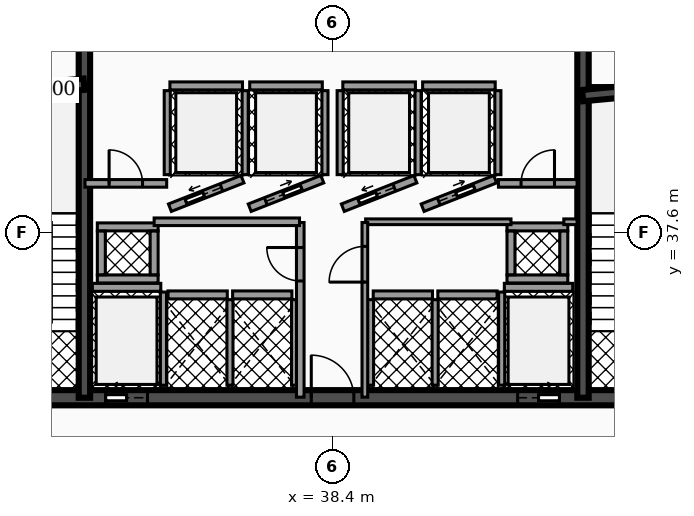
"""IFC4 building model, lengths in metres.
Left out: names, types, materials, properties, quantities, classifications, styles, units other than length and angle.
Written with IfcOpenShell. Run it as: python <this file> out.ifc"""

import sys

from ifc_helpers import new_model, si_unit, direction, frame, frame_2d, origin, place, context, subcontext, project, spatial, rectangle, extrude, element, fill, save


model = new_model("IFC4")
c1 = context("Model", 3, precision=1e-05, world=origin(), true_north=direction((0.0, 1.0)))
c2 = subcontext(c1, "Body", "Model", "MODEL_VIEW")
j1 = project(units=[si_unit("LENGTHUNIT", "METRE"), si_unit("PLANEANGLEUNIT", "RADIAN")], contexts=[c1])
p1 = place(None, origin())
s1 = spatial("IfcSite", under=j1, at=p1, CompositionType="ELEMENT")
p2 = place(p1, origin())
s2 = spatial("IfcBuilding", under=s1, at=p2, CompositionType="ELEMENT")
p3 = place(p2, frame((0.0, 0.0, 64.26)))
s3 = spatial("IfcBuildingStorey", under=s2, at=p3, CompositionType="ELEMENT", Elevation=64.26)
p4 = place(p3, frame((28.4, 33.25, 0.0), z_axis=(0.0, 0.0, 1.0), x_axis=(1.0, 0.0, 0.0)))
e1 = element("IfcWall", 1, at=p4, inside=s3, PredefinedType="SHEAR", context=c2, shape_type="SweptSolid", body=[
    extrude(rectangle(XDim=20.06, YDim=0.4, at=frame_2d((10.03, 0.0))), origin(), (0.0, 0.0, 1.0), 3.82),
])
p5 = place(p4, frame((4.03, 0.0, 0.0)))
e2 = element("IfcOpeningElement", 2, at=p5, cuts=e1, PredefinedType="OPENING", context=c2, shape_type="SweptSolid", body=[
    extrude(rectangle(XDim=1.1, YDim=2.15, at=frame_2d((0.55, 1.075))), frame((0.0, 0.21, 0.0), z_axis=(0.0, -1.0, 0.0), x_axis=(1.0, 0.0, 0.0)), (0.0, 0.0, 1.0), 0.42),
])
p6 = place(p4, frame((14.87, 0.0, 0.0)))
e3 = element("IfcOpeningElement", 3, at=p6, cuts=e1, PredefinedType="OPENING", context=c2, shape_type="SweptSolid", body=[
    extrude(rectangle(XDim=1.1, YDim=2.15, at=frame_2d((0.55, 1.075))), frame((0.0, 0.21, 0.0), z_axis=(0.0, -1.0, 0.0), x_axis=(1.0, 0.0, 0.0)), (0.0, 0.0, 1.0), 0.42),
])
p7 = place(p4, frame((1.31, 0.0, 0.0)))
e4 = element("IfcOpeningElement", 4, at=p7, cuts=e1, PredefinedType="OPENING", context=c2, shape_type="SweptSolid", body=[
    extrude(rectangle(XDim=1.1, YDim=2.2, at=frame_2d((0.55, 1.1))), frame((0.0, 0.21, 0.0), z_axis=(0.0, -1.0, 0.0), x_axis=(1.0, 0.0, 0.0)), (0.0, 0.0, 1.0), 0.42),
])
p8 = place(p4, frame((9.44, 0.0, 0.0)))
e5 = element("IfcOpeningElement", 5, at=p8, cuts=e1, PredefinedType="OPENING", context=c2, shape_type="SweptSolid", body=[
    extrude(rectangle(XDim=1.12, YDim=2.05, at=frame_2d((0.56, 1.025))), frame((0.0, 0.21, 0.0), z_axis=(0.0, -1.0, 0.0), x_axis=(1.0, 0.0, 0.0)), (0.0, 0.0, 1.0), 0.42),
])
p9 = place(p4, frame((17.65, 0.0, 0.0)))
e6 = element("IfcOpeningElement", 6, at=p9, cuts=e1, PredefinedType="OPENING", context=c2, shape_type="SweptSolid", body=[
    extrude(rectangle(XDim=1.1, YDim=2.2, at=frame_2d((0.55, 1.1))), frame((0.0, 0.21, 0.0), z_axis=(0.0, -1.0, 0.0), x_axis=(1.0, 0.0, 0.0)), (0.0, 0.0, 1.0), 0.42),
])
for number, where, z_axis, x_axis in (
    (7, (31.87, 33.25, 0.0), (0.0, 0.0, 1.0), (0.0, 1.0, 0.0)),
    (8, (44.99, 33.25, 0.0), (0.0, 0.0, 1.0), (0.0, 1.0, 0.0)),
):
    element("IfcWall", number, at=place(p3, frame(where, z_axis=z_axis, x_axis=x_axis)), inside=s3, PredefinedType="SHEAR", context=c2, shape_type="SweptSolid", body=[
        extrude(rectangle(XDim=10.2, YDim=0.3, at=frame_2d((5.1, 0.0))), origin(), (0.0, 0.0, 1.0), 3.82),
    ])
p10 = place(p3, frame((28.64, 41.2, 0.0), z_axis=(0.0, 0.0, 1.0), x_axis=(0.995687118776, 0.092774789157, 0.0)))
e9 = element("IfcWall", 9, at=p10, inside=s3, PredefinedType="SHEAR", context=c2, shape_type="SweptSolid", body=[
    extrude(rectangle(XDim=3.234, YDim=0.3, at=frame_2d((1.617, 0.0))), origin(), (0.0, 0.0, 1.0), 3.82),
])
p11 = place(p3, frame((44.98, 41.2, 0.0), z_axis=(0.0, 0.0, 1.0), x_axis=(0.995686468965, 0.09278176286, 0.0)))
e10 = element("IfcWall", 10, at=p11, inside=s3, PredefinedType="SHEAR", context=c2, shape_type="SweptSolid", body=[
    extrude(rectangle(XDim=3.234, YDim=0.3, at=frame_2d((1.617, 0.0))), origin(), (0.0, 0.0, 1.0), 3.82),
])
p12 = place(p3, frame((32.08, 36.155, 0.0), z_axis=(0.0, 0.0, 1.0), x_axis=(1.0, 0.0, 0.0)))
e11 = element("IfcWall", 11, at=p12, inside=s3, PredefinedType="SOLIDWALL", context=c2, shape_type="SweptSolid", body=[
    extrude(rectangle(XDim=1.8, YDim=0.21, at=frame_2d((0.9, 0.0))), origin(), (0.0, 0.0, 1.0), 2.792),
])
p13 = place(p3, frame((33.95, 33.58, 0.0), z_axis=(0.0, 0.0, 1.0), x_axis=(0.0, 1.0, 0.0)))
e12 = element("IfcWall", 12, at=p13, inside=s3, PredefinedType="SOLIDWALL", context=c2, shape_type="SweptSolid", body=[
    extrude(rectangle(XDim=2.45, YDim=0.16, at=frame_2d((1.225, 0.0))), origin(), (0.0, 0.0, 1.0), 2.792),
])
p14 = place(p3, frame((42.92, 36.155, 0.0), z_axis=(0.0, 0.0, 1.0), x_axis=(1.0, 0.0, 0.0)))
e13 = element("IfcWall", 13, at=p14, inside=s3, PredefinedType="SOLIDWALL", context=c2, shape_type="SweptSolid", body=[
    extrude(rectangle(XDim=1.8, YDim=0.21, at=frame_2d((0.9, 0.0))), origin(), (0.0, 0.0, 1.0), 2.792),
])
p15 = place(p3, frame((42.85, 33.58, 0.0), z_axis=(0.0, 0.0, 1.0), x_axis=(0.0, 1.0, 0.0)))
e14 = element("IfcWall", 14, at=p15, inside=s3, PredefinedType="SOLIDWALL", context=c2, shape_type="SweptSolid", body=[
    extrude(rectangle(XDim=2.45, YDim=0.16, at=frame_2d((1.225, 0.0))), origin(), (0.0, 0.0, 1.0), 2.792),
])
p16 = place(p3, frame((34.12, 38.25, 0.0), z_axis=(0.0, 0.0, 1.0), x_axis=(0.930804993012, 0.36551616241, 0.0)))
e15 = element("IfcWall", 15, at=p16, inside=s3, PredefinedType="SOLIDWALL", context=c2, shape_type="SweptSolid", body=[
    extrude(rectangle(XDim=2.052, YDim=0.21, at=frame_2d((1.026, 0.0))), origin(), (0.0, 0.0, 1.0), 2.792),
])
p17 = place(p16, frame((0.455, 0.0, 0.0)))
e16 = element("IfcOpeningElement", 16, at=p17, cuts=e15, PredefinedType="OPENING", context=c2, shape_type="SweptSolid", body=[
    extrude(rectangle(XDim=1.0, YDim=2.1, at=frame_2d((0.5, 1.05))), frame((0.0, 0.115, 0.0), z_axis=(0.0, -1.0, 0.0), x_axis=(1.0, 0.0, 0.0)), (0.0, 0.0, 1.0), 0.23),
])
p18 = place(p3, frame((34.12, 41.455, 0.0), z_axis=(0.0, 0.0, 1.0), x_axis=(1.0, 0.0, 0.0)))
e17 = element("IfcWall", 17, at=p18, inside=s3, PredefinedType="SOLIDWALL", context=c2, shape_type="SweptSolid", body=[
    extrude(rectangle(XDim=1.91, YDim=0.21, at=frame_2d((0.955, 0.0))), origin(), (0.0, 0.0, 1.0), 2.792),
])
for number, where, z_axis, x_axis in (
    (18, (34.05, 39.12, 0.0), (0.0, 0.0, 1.0), (0.0, 1.0, 0.0)),
    (19, (36.1, 39.12, 0.0), (0.0, 0.0, 1.0), (0.0, 1.0, 0.0)),
):
    element("IfcWall", number, at=place(p3, frame(where, z_axis=z_axis, x_axis=x_axis)), inside=s3, PredefinedType="SOLIDWALL", context=c2, shape_type="SweptSolid", body=[
        extrude(rectangle(XDim=2.21, YDim=0.16, at=frame_2d((1.105, 0.0))), origin(), (0.0, 0.0, 1.0), 2.792),
    ])
p19 = place(p3, frame((36.22, 38.25, 0.0), z_axis=(0.0, 0.0, 1.0), x_axis=(0.930804993012, 0.36551616241, 0.0)))
e20 = element("IfcWall", 20, at=p19, inside=s3, PredefinedType="SOLIDWALL", context=c2, shape_type="SweptSolid", body=[
    extrude(rectangle(XDim=2.052, YDim=0.21, at=frame_2d((1.026, 0.0))), origin(), (0.0, 0.0, 1.0), 2.792),
])
p20 = place(p19, frame((0.455, 0.0, 0.0)))
e21 = element("IfcOpeningElement", 21, at=p20, cuts=e20, PredefinedType="OPENING", context=c2, shape_type="SweptSolid", body=[
    extrude(rectangle(XDim=1.0, YDim=2.1, at=frame_2d((0.5, 1.05))), frame((0.0, 0.115, 0.0), z_axis=(0.0, -1.0, 0.0), x_axis=(1.0, 0.0, 0.0)), (0.0, 0.0, 1.0), 0.23),
])
p21 = place(p3, frame((36.22, 41.455, 0.0), z_axis=(0.0, 0.0, 1.0), x_axis=(1.0, 0.0, 0.0)))
e22 = element("IfcWall", 22, at=p21, inside=s3, PredefinedType="SOLIDWALL", context=c2, shape_type="SweptSolid", body=[
    extrude(rectangle(XDim=1.91, YDim=0.21, at=frame_2d((0.955, 0.0))), origin(), (0.0, 0.0, 1.0), 2.792),
])
p22 = place(p3, frame((38.2, 39.12, 0.0), z_axis=(0.0, 0.0, 1.0), x_axis=(0.0, 1.0, 0.0)))
e23 = element("IfcWall", 23, at=p22, inside=s3, PredefinedType="SOLIDWALL", context=c2, shape_type="SweptSolid", body=[
    extrude(rectangle(XDim=2.21, YDim=0.16, at=frame_2d((1.105, 0.0))), origin(), (0.0, 0.0, 1.0), 2.792),
])
p23 = place(p3, frame((38.67, 38.25, 0.0), z_axis=(0.0, 0.0, 1.0), x_axis=(0.930820886763, 0.3654756856, 0.0)))
e24 = element("IfcWall", 24, at=p23, inside=s3, PredefinedType="SOLIDWALL", context=c2, shape_type="SweptSolid", body=[
    extrude(rectangle(XDim=2.052, YDim=0.21, at=frame_2d((1.026, 0.0))), origin(), (0.0, 0.0, 1.0), 2.792),
])
p24 = place(p23, frame((0.455, 0.0, 0.0)))
e25 = element("IfcOpeningElement", 25, at=p24, cuts=e24, PredefinedType="OPENING", context=c2, shape_type="SweptSolid", body=[
    extrude(rectangle(XDim=1.0, YDim=2.1, at=frame_2d((0.5, 1.05))), frame((0.0, 0.115, 0.0), z_axis=(0.0, -1.0, 0.0), x_axis=(1.0, 0.0, 0.0)), (0.0, 0.0, 1.0), 0.23),
])
p25 = place(p3, frame((38.67, 41.455, 0.0), z_axis=(0.0, 0.0, 1.0), x_axis=(1.0, 0.0, 0.0)))
e26 = element("IfcWall", 26, at=p25, inside=s3, PredefinedType="SOLIDWALL", context=c2, shape_type="SweptSolid", body=[
    extrude(rectangle(XDim=1.91, YDim=0.21, at=frame_2d((0.955, 0.0))), origin(), (0.0, 0.0, 1.0), 2.792),
])
for number, where, z_axis, x_axis in (
    (27, (38.6, 39.12, 0.0), (0.0, 0.0, 1.0), (0.0, 1.0, 0.0)),
    (28, (40.65, 39.12, 0.0), (0.0, 0.0, 1.0), (0.0, 1.0, 0.0)),
):
    element("IfcWall", number, at=place(p3, frame(where, z_axis=z_axis, x_axis=x_axis)), inside=s3, PredefinedType="SOLIDWALL", context=c2, shape_type="SweptSolid", body=[
        extrude(rectangle(XDim=2.21, YDim=0.16, at=frame_2d((1.105, 0.0))), origin(), (0.0, 0.0, 1.0), 2.792),
    ])
p26 = place(p3, frame((40.77, 38.25, 0.0), z_axis=(0.0, 0.0, 1.0), x_axis=(0.930804993012, 0.36551616241, 0.0)))
e29 = element("IfcWall", 29, at=p26, inside=s3, PredefinedType="SOLIDWALL", context=c2, shape_type="SweptSolid", body=[
    extrude(rectangle(XDim=2.052, YDim=0.21, at=frame_2d((1.026, 0.0))), origin(), (0.0, 0.0, 1.0), 2.792),
])
p27 = place(p26, frame((0.455, 0.0, 0.0)))
e30 = element("IfcOpeningElement", 30, at=p27, cuts=e29, PredefinedType="OPENING", context=c2, shape_type="SweptSolid", body=[
    extrude(rectangle(XDim=1.0, YDim=2.1, at=frame_2d((0.5, 1.05))), frame((0.0, 0.115, 0.0), z_axis=(0.0, -1.0, 0.0), x_axis=(1.0, 0.0, 0.0)), (0.0, 0.0, 1.0), 0.23),
])
p28 = place(p3, frame((40.77, 41.455, 0.0), z_axis=(0.0, 0.0, 1.0), x_axis=(1.0, 0.0, 0.0)))
e31 = element("IfcWall", 31, at=p28, inside=s3, PredefinedType="SOLIDWALL", context=c2, shape_type="SweptSolid", body=[
    extrude(rectangle(XDim=1.91, YDim=0.21, at=frame_2d((0.955, 0.0))), origin(), (0.0, 0.0, 1.0), 2.792),
])
p29 = place(p3, frame((42.75, 39.12, 0.0), z_axis=(0.0, 0.0, 1.0), x_axis=(0.0, 1.0, 0.0)))
e32 = element("IfcWall", 32, at=p29, inside=s3, PredefinedType="SOLIDWALL", context=c2, shape_type="SweptSolid", body=[
    extrude(rectangle(XDim=2.21, YDim=0.16, at=frame_2d((1.105, 0.0))), origin(), (0.0, 0.0, 1.0), 2.792),
])
p30 = place(p3, frame((34.07, 35.955, 0.0), z_axis=(0.0, 0.0, 1.0), x_axis=(1.0, 0.0, 0.0)))
e33 = element("IfcWall", 33, at=p30, inside=s3, PredefinedType="SOLIDWALL", context=c2, shape_type="SweptSolid", body=[
    extrude(rectangle(XDim=1.56, YDim=0.21, at=frame_2d((0.78, 0.0))), origin(), (0.0, 0.0, 1.0), 2.792),
])
p31 = place(p3, frame((35.7, 33.58, 0.0), z_axis=(0.0, 0.0, 1.0), x_axis=(0.0, 1.0, 0.0)))
e34 = element("IfcWall", 34, at=p31, inside=s3, PredefinedType="SOLIDWALL", context=c2, shape_type="SweptSolid", body=[
    extrude(rectangle(XDim=2.25, YDim=0.16, at=frame_2d((1.125, 0.0))), origin(), (0.0, 0.0, 1.0), 2.792),
])
p32 = place(p3, frame((35.77, 35.955, 0.0), z_axis=(0.0, 0.0, 1.0), x_axis=(1.0, 0.0, 0.0)))
e35 = element("IfcWall", 35, at=p32, inside=s3, PredefinedType="SOLIDWALL", context=c2, shape_type="SweptSolid", body=[
    extrude(rectangle(XDim=1.56, YDim=0.21, at=frame_2d((0.78, 0.0))), origin(), (0.0, 0.0, 1.0), 2.792),
])
p33 = place(p3, frame((37.4, 33.58, 0.0), z_axis=(0.0, 0.0, 1.0), x_axis=(0.0, 1.0, 0.0)))
e36 = element("IfcWall", 36, at=p33, inside=s3, PredefinedType="SOLIDWALL", context=c2, shape_type="SweptSolid", body=[
    extrude(rectangle(XDim=2.25, YDim=0.16, at=frame_2d((1.125, 0.0))), origin(), (0.0, 0.0, 1.0), 2.792),
])
p34 = place(p3, frame((39.47, 35.955, 0.0), z_axis=(0.0, 0.0, 1.0), x_axis=(1.0, 0.0, 0.0)))
e37 = element("IfcWall", 37, at=p34, inside=s3, PredefinedType="SOLIDWALL", context=c2, shape_type="SweptSolid", body=[
    extrude(rectangle(XDim=1.56, YDim=0.21, at=frame_2d((0.78, 0.0))), origin(), (0.0, 0.0, 1.0), 2.792),
])
for number, where, z_axis, x_axis in (
    (38, (39.4, 33.58, 0.0), (0.0, 0.0, 1.0), (0.0, 1.0, 0.0)),
    (39, (41.1, 33.58, 0.0), (0.0, 0.0, 1.0), (0.0, 1.0, 0.0)),
):
    element("IfcWall", number, at=place(p3, frame(where, z_axis=z_axis, x_axis=x_axis)), inside=s3, PredefinedType="SOLIDWALL", context=c2, shape_type="SweptSolid", body=[
        extrude(rectangle(XDim=2.25, YDim=0.16, at=frame_2d((1.125, 0.0))), origin(), (0.0, 0.0, 1.0), 2.792),
    ])
p35 = place(p3, frame((41.17, 35.955, 0.0), z_axis=(0.0, 0.0, 1.0), x_axis=(1.0, 0.0, 0.0)))
e40 = element("IfcWall", 40, at=p35, inside=s3, PredefinedType="SOLIDWALL", context=c2, shape_type="SweptSolid", body=[
    extrude(rectangle(XDim=1.56, YDim=0.21, at=frame_2d((0.78, 0.0))), origin(), (0.0, 0.0, 1.0), 2.792),
])
for number, where, z_axis, x_axis in (
    (41, (32.21, 36.375, 0.0), (0.0, 0.0, 1.0), (1.0, 0.0, 0.0)),
    (42, (32.21, 37.745, 0.0), (0.0, 0.0, 1.0), (1.0, 0.0, 0.0)),
):
    element("IfcWall", number, at=place(p3, frame(where, z_axis=z_axis, x_axis=x_axis)), inside=s3, PredefinedType="SOLIDWALL", context=c2, shape_type="SweptSolid", body=[
        extrude(rectangle(XDim=1.6, YDim=0.21, at=frame_2d((0.8, 0.0))), origin(), (0.0, 0.0, 1.0), 3.82),
    ])
for number, where, z_axis, x_axis in (
    (43, (32.315, 36.485, 0.0), (0.0, 0.0, 1.0), (0.0, 1.0, 0.0)),
    (44, (33.705, 36.485, 0.0), (0.0, 0.0, 1.0), (0.0, 1.0, 0.0)),
):
    element("IfcWall", number, at=place(p3, frame(where, z_axis=z_axis, x_axis=x_axis)), inside=s3, PredefinedType="SOLIDWALL", context=c2, shape_type="SweptSolid", body=[
        extrude(rectangle(XDim=1.15, YDim=0.21, at=frame_2d((0.575, 0.0))), origin(), (0.0, 0.0, 1.0), 3.82),
    ])
for number, where, z_axis, x_axis in (
    (45, (42.99, 36.375, 0.0), (0.0, 0.0, 1.0), (1.0, 0.0, 0.0)),
    (46, (42.99, 37.745, 0.0), (0.0, 0.0, 1.0), (1.0, 0.0, 0.0)),
):
    element("IfcWall", number, at=place(p3, frame(where, z_axis=z_axis, x_axis=x_axis)), inside=s3, PredefinedType="SOLIDWALL", context=c2, shape_type="SweptSolid", body=[
        extrude(rectangle(XDim=1.6, YDim=0.21, at=frame_2d((0.8, 0.0))), origin(), (0.0, 0.0, 1.0), 3.82),
    ])
for number, where, z_axis, x_axis in (
    (47, (43.095, 36.485, 0.0), (0.0, 0.0, 1.0), (0.0, 1.0, 0.0)),
    (48, (44.485, 36.485, 0.0), (0.0, 0.0, 1.0), (0.0, 1.0, 0.0)),
):
    element("IfcWall", number, at=place(p3, frame(where, z_axis=z_axis, x_axis=x_axis)), inside=s3, PredefinedType="SOLIDWALL", context=c2, shape_type="SweptSolid", body=[
        extrude(rectangle(XDim=1.15, YDim=0.21, at=frame_2d((0.575, 0.0))), origin(), (0.0, 0.0, 1.0), 3.82),
    ])
p36 = place(p3, frame((37.55, 33.265, 0.0), z_axis=(0.0, 0.0, 1.0), x_axis=(0.0, 1.0, 0.0)))
e49 = element("IfcWall", 49, at=p36, inside=s3, PredefinedType="PARTITIONING", context=c2, shape_type="SweptSolid", body=[
    extrude(rectangle(XDim=4.595, YDim=0.2, at=frame_2d((2.298, 0.0))), origin(), (0.0, 0.0, 1.0), 2.777),
])
p37 = place(p36, frame((3.058, 0.0, 0.0)))
e50 = element("IfcOpeningElement", 50, at=p37, cuts=e49, PredefinedType="OPENING", context=c2, shape_type="SweptSolid", body=[
    extrude(rectangle(XDim=0.88, YDim=2.05, at=frame_2d((0.44, 1.025))), frame((0.0, 0.11, 0.0), z_axis=(0.0, -1.0, 0.0), x_axis=(1.0, 0.0, 0.0)), (0.0, 0.0, 1.0), 0.22),
])
p38 = place(p3, frame((33.705, 37.88, 0.0), z_axis=(0.0, 0.0, 1.0), x_axis=(1.0, 0.0, 0.0)))
e51 = element("IfcWall", 51, at=p38, inside=s3, PredefinedType="PARTITIONING", context=c2, shape_type="SweptSolid", body=[
    extrude(rectangle(XDim=3.825, YDim=0.2, at=frame_2d((1.913, 0.0))), origin(), (0.0, 0.0, 1.0), 2.777),
])
p39 = place(p3, frame((31.885, 38.89, 0.0), z_axis=(0.0, 0.0, 1.0), x_axis=(1.0, 0.0, 0.0)))
e52 = element("IfcWall", 52, at=p39, inside=s3, PredefinedType="PARTITIONING", context=c2, shape_type="SweptSolid", body=[
    extrude(rectangle(XDim=2.15, YDim=0.2, at=frame_2d((1.075, 0.0))), origin(), (0.0, 0.0, 1.0), 2.777),
])
p40 = place(p39, frame((0.635, 0.0, 0.0)))
e53 = element("IfcOpeningElement", 53, at=p40, cuts=e52, PredefinedType="OPENING", context=c2, shape_type="SweptSolid", body=[
    extrude(rectangle(XDim=0.88, YDim=2.05, at=frame_2d((0.44, 1.025))), frame((0.0, 0.11, 0.0), z_axis=(0.0, -1.0, 0.0), x_axis=(1.0, 0.0, 0.0)), (0.0, 0.0, 1.0), 0.22),
])
p41 = place(p3, frame((42.765, 38.89, 0.0), z_axis=(0.0, 0.0, 1.0), x_axis=(1.0, 0.0, 0.0)))
e54 = element("IfcWall", 54, at=p41, inside=s3, PredefinedType="PARTITIONING", context=c2, shape_type="SweptSolid", body=[
    extrude(rectangle(XDim=2.07, YDim=0.2, at=frame_2d((1.035, 0.0))), origin(), (0.0, 0.0, 1.0), 2.777),
])
p42 = place(p41, frame((0.595, 0.0, 0.0)))
e55 = element("IfcOpeningElement", 55, at=p42, cuts=e54, PredefinedType="OPENING", context=c2, shape_type="SweptSolid", body=[
    extrude(rectangle(XDim=0.88, YDim=2.05, at=frame_2d((0.44, 1.025))), frame((0.0, 0.11, 0.0), z_axis=(0.0, -1.0, 0.0), x_axis=(1.0, 0.0, 0.0)), (0.0, 0.0, 1.0), 0.22),
])
p43 = place(p3, frame((39.27, 37.88, 0.0), z_axis=(0.0, 0.0, 1.0), x_axis=(1.0, 0.0, 0.0)))
e56 = element("IfcWall", 56, at=p43, inside=s3, PredefinedType="PARTITIONING", context=c2, shape_type="SweptSolid", body=[
    extrude(rectangle(XDim=3.825, YDim=0.15, at=frame_2d((1.913, 0.0))), origin(), (0.0, 0.0, 1.0), 2.777),
])
p44 = place(p3, frame((44.485, 37.88, 0.0), z_axis=(0.0, 0.0, 1.0), x_axis=(1.0, 0.0, 0.0)))
e57 = element("IfcWall", 57, at=p44, inside=s3, PredefinedType="PARTITIONING", context=c2, shape_type="SweptSolid", body=[
    extrude(rectangle(XDim=0.35, YDim=0.15, at=frame_2d((0.175, 0.0))), origin(), (0.0, 0.0, 1.0), 2.777),
])
p45 = place(p3, frame((39.25, 33.265, 0.0), z_axis=(0.0, 0.0, 1.0), x_axis=(0.0, 1.0, 0.0)))
e58 = element("IfcWall", 58, at=p45, inside=s3, PredefinedType="PARTITIONING", context=c2, shape_type="SweptSolid", body=[
    extrude(rectangle(XDim=4.595, YDim=0.15, at=frame_2d((2.298, 0.0))), origin(), (0.0, 0.0, 1.0), 2.777),
])
p46 = place(p45, frame((3.028, 0.0, 0.0)))
e59 = element("IfcOpeningElement", 59, at=p46, cuts=e58, PredefinedType="OPENING", context=c2, shape_type="SweptSolid", body=[
    extrude(rectangle(XDim=0.94, YDim=2.05, at=frame_2d((0.47, 1.025))), frame((0.0, 0.085, 0.0), z_axis=(0.0, -1.0, 0.0), x_axis=(1.0, 0.0, 0.0)), (0.0, 0.0, 1.0), 0.17),
])
p47 = place(p5, origin())
e60 = element("IfcDoor", 60, at=p47, inside=s3, OperationType="SLIDING_TO_LEFT", PredefinedType="DOOR", context=c2, shape_type="SweptSolid", body=[
    extrude(rectangle(XDim=1.1, YDim=2.15, at=frame_2d((0.55, 1.075))), frame((0.0, 0.025, 0.0), z_axis=(0.0, -1.0, 0.0), x_axis=(1.0, 0.0, 0.0)), (0.0, 0.0, 1.0), 0.05),
])
fill(e2, e60)
p48 = place(p6, origin())
e61 = element("IfcDoor", 61, at=p48, inside=s3, OperationType="SLIDING_TO_RIGHT", PredefinedType="DOOR", context=c2, shape_type="SweptSolid", body=[
    extrude(rectangle(XDim=1.1, YDim=2.15, at=frame_2d((0.55, 1.075))), frame((0.0, 0.025, 0.0), z_axis=(0.0, -1.0, 0.0), x_axis=(1.0, 0.0, 0.0)), (0.0, 0.0, 1.0), 0.05),
])
fill(e3, e61)
p49 = place(p17, origin())
e62 = element("IfcDoor", 62, at=p49, inside=s3, OperationType="SLIDING_TO_LEFT", PredefinedType="DOOR", context=c2, shape_type="SweptSolid", body=[
    extrude(rectangle(XDim=1.0, YDim=2.1, at=frame_2d((0.5, 1.05))), frame((0.0, 0.025, 0.0), z_axis=(0.0, -1.0, 0.0), x_axis=(1.0, 0.0, 0.0)), (0.0, 0.0, 1.0), 0.05),
])
fill(e16, e62)
p50 = place(p20, origin())
e63 = element("IfcDoor", 63, at=p50, inside=s3, OperationType="SLIDING_TO_RIGHT", PredefinedType="DOOR", context=c2, shape_type="SweptSolid", body=[
    extrude(rectangle(XDim=1.0, YDim=2.1, at=frame_2d((0.5, 1.05))), frame((0.0, 0.025, 0.0), z_axis=(0.0, -1.0, 0.0), x_axis=(1.0, 0.0, 0.0)), (0.0, 0.0, 1.0), 0.05),
])
fill(e21, e63)
p51 = place(p24, origin())
e64 = element("IfcDoor", 64, at=p51, inside=s3, OperationType="SLIDING_TO_LEFT", PredefinedType="DOOR", context=c2, shape_type="SweptSolid", body=[
    extrude(rectangle(XDim=1.0, YDim=2.1, at=frame_2d((0.5, 1.05))), frame((0.0, 0.025, 0.0), z_axis=(0.0, -1.0, 0.0), x_axis=(1.0, 0.0, 0.0)), (0.0, 0.0, 1.0), 0.05),
])
fill(e25, e64)
p52 = place(p27, origin())
e65 = element("IfcDoor", 65, at=p52, inside=s3, OperationType="SLIDING_TO_RIGHT", PredefinedType="DOOR", context=c2, shape_type="SweptSolid", body=[
    extrude(rectangle(XDim=1.0, YDim=2.1, at=frame_2d((0.5, 1.05))), frame((0.0, 0.025, 0.0), z_axis=(0.0, -1.0, 0.0), x_axis=(1.0, 0.0, 0.0)), (0.0, 0.0, 1.0), 0.05),
])
fill(e30, e65)
p53 = place(p8, origin())
e66 = element("IfcDoor", 66, at=p53, inside=s3, OperationType="SINGLE_SWING_LEFT", PredefinedType="DOOR", context=c2, shape_type="SweptSolid", body=[
    extrude(rectangle(XDim=1.12, YDim=2.05, at=frame_2d((0.56, 1.025))), frame((0.0, 0.025, 0.0), z_axis=(0.0, -1.0, 0.0), x_axis=(1.0, 0.0, 0.0)), (0.0, 0.0, 1.0), 0.05),
])
fill(e5, e66)
p54 = place(p37, origin())
e67 = element("IfcDoor", 67, at=p54, inside=s3, OperationType="SINGLE_SWING_RIGHT", PredefinedType="DOOR", context=c2, shape_type="SweptSolid", body=[
    extrude(rectangle(XDim=0.88, YDim=2.05, at=frame_2d((0.44, 1.025))), frame((0.0, 0.025, 0.0), z_axis=(0.0, -1.0, 0.0), x_axis=(1.0, 0.0, 0.0)), (0.0, 0.0, 1.0), 0.05),
])
fill(e50, e67)
p55 = place(p40, origin())
e68 = element("IfcDoor", 68, at=p55, inside=s3, OperationType="SINGLE_SWING_LEFT", PredefinedType="DOOR", context=c2, shape_type="SweptSolid", body=[
    extrude(rectangle(XDim=0.88, YDim=2.05, at=frame_2d((0.44, 1.025))), frame((0.0, 0.025, 0.0), z_axis=(0.0, -1.0, 0.0), x_axis=(1.0, 0.0, 0.0)), (0.0, 0.0, 1.0), 0.05),
])
fill(e53, e68)
p56 = place(p42, origin())
e69 = element("IfcDoor", 69, at=p56, inside=s3, OperationType="SINGLE_SWING_RIGHT", PredefinedType="DOOR", context=c2, shape_type="SweptSolid", body=[
    extrude(rectangle(XDim=0.88, YDim=2.05, at=frame_2d((0.44, 1.025))), frame((0.0, 0.025, 0.0), z_axis=(0.0, -1.0, 0.0), x_axis=(1.0, 0.0, 0.0)), (0.0, 0.0, 1.0), 0.05),
])
fill(e55, e69)
p57 = place(p46, origin())
e70 = element("IfcDoor", 70, at=p57, inside=s3, OperationType="SINGLE_SWING_LEFT", PredefinedType="DOOR", context=c2, shape_type="SweptSolid", body=[
    extrude(rectangle(XDim=0.94, YDim=2.05, at=frame_2d((0.47, 1.025))), frame((0.0, 0.025, 0.0), z_axis=(0.0, -1.0, 0.0), x_axis=(1.0, 0.0, 0.0)), (0.0, 0.0, 1.0), 0.05),
])
fill(e59, e70)
save(model, sys.argv[1])
